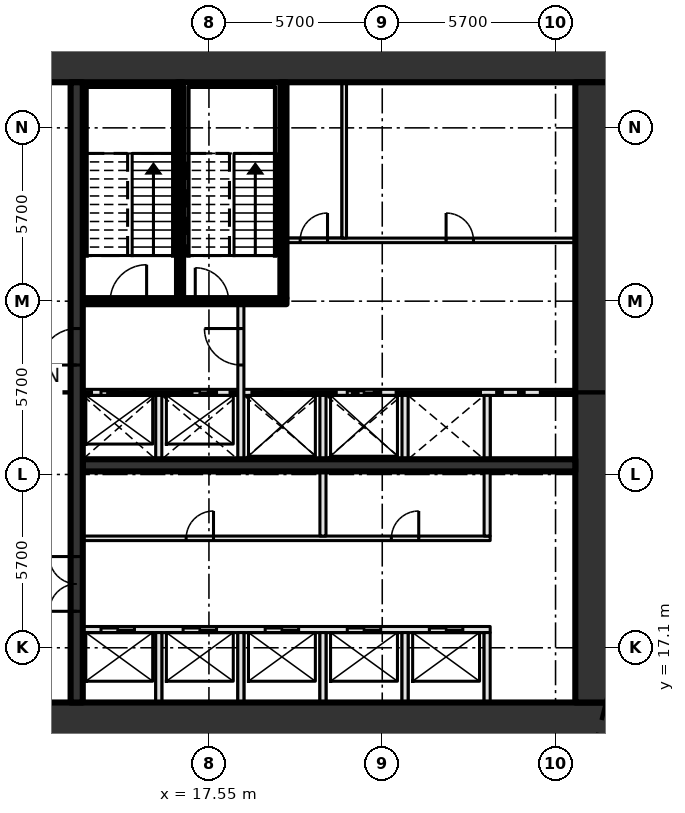
"""IFC4 building model, lengths in metres.
Left out: names, types, materials, properties, quantities, classifications, styles, units other than length and angle.
Written with IfcOpenShell. Run it as: python <this file> out.ifc"""

import sys

from ifc_helpers import new_model, si_unit, direction, frame, frame_2d, origin, place, context, subcontext, project, spatial, rectangle, extrude, element, fill, save


model = new_model("IFC4")
c1 = context("Model", 3, precision=1e-05, world=origin(), true_north=direction((0.0, 1.0)))
c2 = subcontext(c1, "Body", "Model", "MODEL_VIEW")
j1 = project(units=[si_unit("LENGTHUNIT", "METRE"), si_unit("PLANEANGLEUNIT", "RADIAN")], contexts=[c1])
p1 = place(None, origin())
s1 = spatial("IfcSite", under=j1, at=p1, CompositionType="ELEMENT")
p2 = place(p1, origin())
s2 = spatial("IfcBuilding", under=s1, at=p2, CompositionType="ELEMENT")
p3 = place(p2, frame((0.0, 0.0, 18.6)))
s3 = spatial("IfcBuildingStorey", under=s2, at=p3, CompositionType="ELEMENT", Elevation=18.6)
p4 = place(p3, frame((8.0, 14.7, -0.45), z_axis=(0.0, 0.0, 1.0), x_axis=(1.0, 0.0, 0.0)))
e1 = element("IfcWall", 1, at=p4, inside=s3, PredefinedType="SHEAR", context=c2, shape_type="SweptSolid", body=[
    extrude(rectangle(XDim=22.8, YDim=1.2, at=frame_2d((11.4, 0.0))), origin(), (0.0, 0.0, 1.0), 4.8),
])
p5 = place(p4, frame((2.3, 0.0, 0.45)))
e2 = element("IfcOpeningElement", 2, at=p5, cuts=e1, PredefinedType="OPENING", context=c2, shape_type="SweptSolid", body=[
    extrude(rectangle(XDim=1.8, YDim=2.1, at=frame_2d((0.9, 1.05))), frame((0.0, 0.61, 0.0), z_axis=(0.0, -1.0, 0.0), x_axis=(1.0, 0.0, 0.0)), (0.0, 0.0, 1.0), 1.22),
])
p6 = place(p3, frame((8.0, 36.3, -0.45), z_axis=(0.0, 0.0, 1.0), x_axis=(1.0, 0.0, 0.0)))
e3 = element("IfcWall", 3, at=p6, inside=s3, PredefinedType="SHEAR", context=c2, shape_type="SweptSolid", body=[
    extrude(rectangle(XDim=22.8, YDim=1.2, at=frame_2d((11.4, 0.0))), origin(), (0.0, 0.0, 1.0), 4.8),
])
p7 = place(p6, frame((2.3, 0.0, 0.45)))
e4 = element("IfcOpeningElement", 4, at=p7, cuts=e3, PredefinedType="OPENING", context=c2, shape_type="SweptSolid", body=[
    extrude(rectangle(XDim=1.8, YDim=2.1, at=frame_2d((0.9, 1.05))), frame((0.0, 0.61, 0.0), z_axis=(0.0, -1.0, 0.0), x_axis=(1.0, 0.0, 0.0)), (0.0, 0.0, 1.0), 1.22),
])
p8 = place(p3, frame((30.2, 15.3, -0.45), z_axis=(0.0, 0.0, 1.0), x_axis=(0.0, 1.0, 0.0)))
e5 = element("IfcWall", 5, at=p8, inside=s3, PredefinedType="SHEAR", context=c2, shape_type="SweptSolid", body=[
    extrude(rectangle(XDim=20.4, YDim=1.2, at=frame_2d((10.2, 0.0))), origin(), (0.0, 0.0, 1.0), 4.8),
])
p9 = place(p3, frame((13.4, 17.7, 0.0), z_axis=(0.0, 0.0, 1.0), x_axis=(1.0, 0.0, 0.0)))
e6 = element("IfcWall", 6, at=p9, inside=s3, PredefinedType="SOLIDWALL", context=c2, shape_type="SweptSolid", body=[
    extrude(rectangle(XDim=13.4, YDim=0.2, at=frame_2d((6.7, 0.0))), origin(), (0.0, 0.0, 1.0), 4.35),
])
p10 = place(p9, frame((0.6, 0.0, 0.0)))
e7 = element("IfcOpeningElement", 7, at=p10, cuts=e6, PredefinedType="OPENING", context=c2, shape_type="SweptSolid", body=[
    extrude(rectangle(XDim=1.1, YDim=2.1, at=frame_2d((0.55, 1.05))), frame((0.0, 0.11, 0.0), z_axis=(0.0, -1.0, 0.0), x_axis=(1.0, 0.0, 0.0)), (0.0, 0.0, 1.0), 0.22),
])
p11 = place(p9, frame((3.3, 0.0, 0.0)))
e8 = element("IfcOpeningElement", 8, at=p11, cuts=e6, PredefinedType="OPENING", context=c2, shape_type="SweptSolid", body=[
    extrude(rectangle(XDim=1.1, YDim=2.1, at=frame_2d((0.55, 1.05))), frame((0.0, 0.11, 0.0), z_axis=(0.0, -1.0, 0.0), x_axis=(1.0, 0.0, 0.0)), (0.0, 0.0, 1.0), 0.22),
])
p12 = place(p9, frame((6.0, 0.0, 0.0)))
e9 = element("IfcOpeningElement", 9, at=p12, cuts=e6, PredefinedType="OPENING", context=c2, shape_type="SweptSolid", body=[
    extrude(rectangle(XDim=1.1, YDim=2.1, at=frame_2d((0.55, 1.05))), frame((0.0, 0.11, 0.0), z_axis=(0.0, -1.0, 0.0), x_axis=(1.0, 0.0, 0.0)), (0.0, 0.0, 1.0), 0.22),
])
p13 = place(p9, frame((8.7, 0.0, 0.0)))
e10 = element("IfcOpeningElement", 10, at=p13, cuts=e6, PredefinedType="OPENING", context=c2, shape_type="SweptSolid", body=[
    extrude(rectangle(XDim=1.1, YDim=2.1, at=frame_2d((0.55, 1.05))), frame((0.0, 0.11, 0.0), z_axis=(0.0, -1.0, 0.0), x_axis=(1.0, 0.0, 0.0)), (0.0, 0.0, 1.0), 0.22),
])
p14 = place(p9, frame((11.4, 0.0, 0.0)))
e11 = element("IfcOpeningElement", 11, at=p14, cuts=e6, PredefinedType="OPENING", context=c2, shape_type="SweptSolid", body=[
    extrude(rectangle(XDim=1.1, YDim=2.1, at=frame_2d((0.55, 1.05))), frame((0.0, 0.11, 0.0), z_axis=(0.0, -1.0, 0.0), x_axis=(1.0, 0.0, 0.0)), (0.0, 0.0, 1.0), 0.22),
])
p15 = place(p3, frame((13.4, 20.7, 0.0), z_axis=(0.0, 0.0, 1.0), x_axis=(1.0, 0.0, 0.0)))
e12 = element("IfcWall", 12, at=p15, inside=s3, PredefinedType="PARTITIONING", context=c2, shape_type="SweptSolid", body=[
    extrude(rectangle(XDim=13.4, YDim=0.15, at=frame_2d((6.7, 0.0))), origin(), (0.0, 0.0, 1.0), 4.35),
])
p16 = place(p15, frame((3.4, 0.0, 0.0)))
e13 = element("IfcOpeningElement", 13, at=p16, cuts=e12, PredefinedType="OPENING", context=c2, shape_type="SweptSolid", body=[
    extrude(rectangle(XDim=0.9, YDim=2.1, at=frame_2d((0.45, 1.05))), frame((0.0, 0.085, 0.0), z_axis=(0.0, -1.0, 0.0), x_axis=(1.0, 0.0, 0.0)), (0.0, 0.0, 1.0), 0.17),
])
p17 = place(p15, frame((10.15, 0.0, 0.0)))
e14 = element("IfcOpeningElement", 14, at=p17, cuts=e12, PredefinedType="OPENING", context=c2, shape_type="SweptSolid", body=[
    extrude(rectangle(XDim=0.9, YDim=2.1, at=frame_2d((0.45, 1.05))), frame((0.0, 0.085, 0.0), z_axis=(0.0, -1.0, 0.0), x_axis=(1.0, 0.0, 0.0)), (0.0, 0.0, 1.0), 0.17),
])
p18 = place(p3, frame((13.4, 23.1, 0.0), z_axis=(0.0, 0.0, 1.0), x_axis=(1.0, 0.0, 0.0)))
e15 = element("IfcWall", 15, at=p18, inside=s3, PredefinedType="SHEAR", context=c2, shape_type="SweptSolid", body=[
    extrude(rectangle(XDim=16.2, YDim=0.4, at=frame_2d((8.1, 0.0))), origin(), (0.0, 0.0, 1.0), 4.35),
])
p19 = place(p3, frame((13.4, 25.5, 0.0), z_axis=(0.0, 0.0, 1.0), x_axis=(1.0, 0.0, 0.0)))
e16 = element("IfcWall", 16, at=p19, inside=s3, PredefinedType="SOLIDWALL", context=c2, shape_type="SweptSolid", body=[
    extrude(rectangle(XDim=16.2, YDim=0.2, at=frame_2d((8.1, 0.0))), origin(), (0.0, 0.0, 1.0), 4.35),
])
p20 = place(p19, frame((0.6, 0.0, 0.0)))
e17 = element("IfcOpeningElement", 17, at=p20, cuts=e16, PredefinedType="OPENING", context=c2, shape_type="SweptSolid", body=[
    extrude(rectangle(XDim=1.1, YDim=2.1, at=frame_2d((0.55, 1.05))), frame((0.0, 0.11, 0.0), z_axis=(0.0, -1.0, 0.0), x_axis=(1.0, 0.0, 0.0)), (0.0, 0.0, 1.0), 0.22),
])
p21 = place(p19, frame((3.3, 0.0, 0.0)))
e18 = element("IfcOpeningElement", 18, at=p21, cuts=e16, PredefinedType="OPENING", context=c2, shape_type="SweptSolid", body=[
    extrude(rectangle(XDim=1.1, YDim=2.1, at=frame_2d((0.55, 1.05))), frame((0.0, 0.11, 0.0), z_axis=(0.0, -1.0, 0.0), x_axis=(1.0, 0.0, 0.0)), (0.0, 0.0, 1.0), 0.22),
])
p22 = place(p19, frame((6.0, 0.0, 0.0)))
e19 = element("IfcOpeningElement", 19, at=p22, cuts=e16, PredefinedType="OPENING", context=c2, shape_type="SweptSolid", body=[
    extrude(rectangle(XDim=1.1, YDim=2.1, at=frame_2d((0.55, 1.05))), frame((0.0, 0.11, 0.0), z_axis=(0.0, -1.0, 0.0), x_axis=(1.0, 0.0, 0.0)), (0.0, 0.0, 1.0), 0.22),
])
p23 = place(p19, frame((8.7, 0.0, 0.0)))
e20 = element("IfcOpeningElement", 20, at=p23, cuts=e16, PredefinedType="OPENING", context=c2, shape_type="SweptSolid", body=[
    extrude(rectangle(XDim=1.1, YDim=2.1, at=frame_2d((0.55, 1.05))), frame((0.0, 0.11, 0.0), z_axis=(0.0, -1.0, 0.0), x_axis=(1.0, 0.0, 0.0)), (0.0, 0.0, 1.0), 0.22),
])
p24 = place(p3, frame((13.4, 28.5, 0.0), z_axis=(0.0, 0.0, 1.0), x_axis=(1.0, 0.0, 0.0)))
e21 = element("IfcWall", 21, at=p24, inside=s3, PredefinedType="SOLIDWALL", context=c2, shape_type="SweptSolid", body=[
    extrude(rectangle(XDim=6.7, YDim=0.2, at=frame_2d((3.35, 0.0))), origin(), (0.0, 0.0, 1.0), 4.35),
])
p25 = place(p24, frame((0.9, 0.0, 0.0)))
e22 = element("IfcOpeningElement", 22, at=p25, cuts=e21, PredefinedType="OPENING", context=c2, shape_type="SweptSolid", body=[
    extrude(rectangle(XDim=1.2, YDim=2.1, at=frame_2d((0.6, 1.05))), frame((0.0, 0.11, 0.0), z_axis=(0.0, -1.0, 0.0), x_axis=(1.0, 0.0, 0.0)), (0.0, 0.0, 1.0), 0.22),
])
p26 = place(p24, frame((3.7, 0.0, 0.0)))
e23 = element("IfcOpeningElement", 23, at=p26, cuts=e21, PredefinedType="OPENING", context=c2, shape_type="SweptSolid", body=[
    extrude(rectangle(XDim=1.1, YDim=2.1, at=frame_2d((0.55, 1.05))), frame((0.0, 0.11, 0.0), z_axis=(0.0, -1.0, 0.0), x_axis=(1.0, 0.0, 0.0)), (0.0, 0.0, 1.0), 0.22),
])
p27 = place(p3, frame((20.1, 30.5, 0.0), z_axis=(0.0, 0.0, 1.0), x_axis=(1.0, 0.0, 0.0)))
e24 = element("IfcWall", 24, at=p27, inside=s3, PredefinedType="PARTITIONING", context=c2, shape_type="SweptSolid", body=[
    extrude(rectangle(XDim=9.5, YDim=0.15, at=frame_2d((4.75, 0.0))), origin(), (0.0, 0.0, 1.0), 4.35),
])
p28 = place(p27, frame((0.45, 0.0, 0.0)))
e25 = element("IfcOpeningElement", 25, at=p28, cuts=e24, PredefinedType="OPENING", context=c2, shape_type="SweptSolid", body=[
    extrude(rectangle(XDim=0.9, YDim=2.1, at=frame_2d((0.45, 1.05))), frame((0.0, 0.085, 0.0), z_axis=(0.0, -1.0, 0.0), x_axis=(1.0, 0.0, 0.0)), (0.0, 0.0, 1.0), 0.17),
])
p29 = place(p27, frame((5.25, 0.0, 0.0)))
e26 = element("IfcOpeningElement", 26, at=p29, cuts=e24, PredefinedType="OPENING", context=c2, shape_type="SweptSolid", body=[
    extrude(rectangle(XDim=0.9, YDim=2.1, at=frame_2d((0.45, 1.05))), frame((0.0, 0.085, 0.0), z_axis=(0.0, -1.0, 0.0), x_axis=(1.0, 0.0, 0.0)), (0.0, 0.0, 1.0), 0.17),
])
p30 = place(p3, frame((13.2, 15.3, 0.0), z_axis=(0.0, 0.0, 1.0), x_axis=(0.0, 1.0, 0.0)))
e27 = element("IfcWall", 27, at=p30, inside=s3, PredefinedType="SHEAR", context=c2, shape_type="SweptSolid", body=[
    extrude(rectangle(XDim=20.4, YDim=0.4, at=frame_2d((10.2, 0.0))), origin(), (0.0, 0.0, 1.0), 4.35),
])
p31 = place(p30, frame((3.0, 0.0, 0.0)))
e28 = element("IfcOpeningElement", 28, at=p31, cuts=e27, PredefinedType="OPENING", context=c2, shape_type="SweptSolid", body=[
    extrude(rectangle(XDim=1.8, YDim=2.1, at=frame_2d((0.9, 1.05))), frame((0.0, 0.21, 0.0), z_axis=(0.0, -1.0, 0.0), x_axis=(1.0, 0.0, 0.0)), (0.0, 0.0, 1.0), 0.42),
])
p32 = place(p30, frame((11.1, 0.0, 0.0)))
e29 = element("IfcOpeningElement", 29, at=p32, cuts=e27, PredefinedType="OPENING", context=c2, shape_type="SweptSolid", body=[
    extrude(rectangle(XDim=1.2, YDim=2.1, at=frame_2d((0.6, 1.05))), frame((0.0, 0.21, 0.0), z_axis=(0.0, -1.0, 0.0), x_axis=(1.0, 0.0, 0.0)), (0.0, 0.0, 1.0), 0.42),
])
p33 = place(p3, frame((15.9, 15.3, 0.0), z_axis=(0.0, 0.0, 1.0), x_axis=(0.0, 1.0, 0.0)))
e30 = element("IfcWall", 30, at=p33, inside=s3, PredefinedType="SOLIDWALL", context=c2, shape_type="SweptSolid", body=[
    extrude(rectangle(XDim=2.3, YDim=0.2, at=frame_2d((1.15, 0.0))), origin(), (0.0, 0.0, 1.0), 4.35),
])
p34 = place(p3, frame((15.9, 23.3, 0.0), z_axis=(0.0, 0.0, 1.0), x_axis=(0.0, 1.0, 0.0)))
e31 = element("IfcWall", 31, at=p34, inside=s3, PredefinedType="SOLIDWALL", context=c2, shape_type="SweptSolid", body=[
    extrude(rectangle(XDim=2.1, YDim=0.2, at=frame_2d((1.05, 0.0))), origin(), (0.0, 0.0, 1.0), 4.35),
])
p35 = place(p3, frame((16.6, 28.6, 0.0), z_axis=(0.0, 0.0, 1.0), x_axis=(0.0, 1.0, 0.0)))
e32 = element("IfcWall", 32, at=p35, inside=s3, PredefinedType="SOLIDWALL", context=c2, shape_type="SweptSolid", body=[
    extrude(rectangle(XDim=7.1, YDim=0.2, at=frame_2d((3.55, 0.0))), origin(), (0.0, 0.0, 1.0), 4.35),
])
p36 = place(p3, frame((18.6, 15.3, 0.0), z_axis=(0.0, 0.0, 1.0), x_axis=(0.0, 1.0, 0.0)))
e33 = element("IfcWall", 33, at=p36, inside=s3, PredefinedType="SOLIDWALL", context=c2, shape_type="SweptSolid", body=[
    extrude(rectangle(XDim=2.3, YDim=0.2, at=frame_2d((1.15, 0.0))), origin(), (0.0, 0.0, 1.0), 4.35),
])
p37 = place(p3, frame((18.6, 23.3, 0.0), z_axis=(0.0, 0.0, 1.0), x_axis=(0.0, 1.0, 0.0)))
e34 = element("IfcWall", 34, at=p37, inside=s3, PredefinedType="SOLIDWALL", context=c2, shape_type="SweptSolid", body=[
    extrude(rectangle(XDim=5.1, YDim=0.2, at=frame_2d((2.55, 0.0))), origin(), (0.0, 0.0, 1.0), 4.35),
])
p38 = place(p37, frame((3.1, 0.0, 0.0)))
e35 = element("IfcOpeningElement", 35, at=p38, cuts=e34, PredefinedType="OPENING", context=c2, shape_type="SweptSolid", body=[
    extrude(rectangle(XDim=1.2, YDim=2.1, at=frame_2d((0.6, 1.05))), frame((0.0, 0.11, 0.0), z_axis=(0.0, -1.0, 0.0), x_axis=(1.0, 0.0, 0.0)), (0.0, 0.0, 1.0), 0.22),
])
p39 = place(p3, frame((20.0, 28.6, 0.0), z_axis=(0.0, 0.0, 1.0), x_axis=(0.0, 1.0, 0.0)))
e36 = element("IfcWall", 36, at=p39, inside=s3, PredefinedType="SOLIDWALL", context=c2, shape_type="SweptSolid", body=[
    extrude(rectangle(XDim=7.1, YDim=0.2, at=frame_2d((3.55, 0.0))), origin(), (0.0, 0.0, 1.0), 4.35),
])
p40 = place(p3, frame((21.3, 15.3, 0.0), z_axis=(0.0, 0.0, 1.0), x_axis=(0.0, 1.0, 0.0)))
e37 = element("IfcWall", 37, at=p40, inside=s3, PredefinedType="SOLIDWALL", context=c2, shape_type="SweptSolid", body=[
    extrude(rectangle(XDim=2.3, YDim=0.2, at=frame_2d((1.15, 0.0))), origin(), (0.0, 0.0, 1.0), 4.35),
])
p41 = place(p3, frame((21.3, 20.775, 0.0), z_axis=(0.0, 0.0, 1.0), x_axis=(0.0, 1.0, 0.0)))
e38 = element("IfcWall", 38, at=p41, inside=s3, PredefinedType="SOLIDWALL", context=c2, shape_type="SweptSolid", body=[
    extrude(rectangle(XDim=4.625, YDim=0.2, at=frame_2d((2.312, 0.0))), origin(), (0.0, 0.0, 1.0), 4.35),
])
p42 = place(p3, frame((22.0, 30.575, 0.0), z_axis=(0.0, 0.0, 1.0), x_axis=(0.0, 1.0, 0.0)))
e39 = element("IfcWall", 39, at=p42, inside=s3, PredefinedType="PARTITIONING", context=c2, shape_type="SweptSolid", body=[
    extrude(rectangle(XDim=5.125, YDim=0.15, at=frame_2d((2.562, 0.0))), origin(), (0.0, 0.0, 1.0), 4.35),
])
p43 = place(p3, frame((24.0, 15.3, 0.0), z_axis=(0.0, 0.0, 1.0), x_axis=(0.0, 1.0, 0.0)))
e40 = element("IfcWall", 40, at=p43, inside=s3, PredefinedType="SOLIDWALL", context=c2, shape_type="SweptSolid", body=[
    extrude(rectangle(XDim=2.3, YDim=0.2, at=frame_2d((1.15, 0.0))), origin(), (0.0, 0.0, 1.0), 4.35),
])
p44 = place(p3, frame((24.0, 23.3, 0.0), z_axis=(0.0, 0.0, 1.0), x_axis=(0.0, 1.0, 0.0)))
e41 = element("IfcWall", 41, at=p44, inside=s3, PredefinedType="SOLIDWALL", context=c2, shape_type="SweptSolid", body=[
    extrude(rectangle(XDim=2.1, YDim=0.2, at=frame_2d((1.05, 0.0))), origin(), (0.0, 0.0, 1.0), 4.35),
])
p45 = place(p3, frame((26.7, 15.3, 0.0), z_axis=(0.0, 0.0, 1.0), x_axis=(0.0, 1.0, 0.0)))
e42 = element("IfcWall", 42, at=p45, inside=s3, PredefinedType="SOLIDWALL", context=c2, shape_type="SweptSolid", body=[
    extrude(rectangle(XDim=2.3, YDim=0.2, at=frame_2d((1.15, 0.0))), origin(), (0.0, 0.0, 1.0), 4.35),
])
p46 = place(p3, frame((26.7, 20.775, 0.0), z_axis=(0.0, 0.0, 1.0), x_axis=(0.0, 1.0, 0.0)))
e43 = element("IfcWall", 43, at=p46, inside=s3, PredefinedType="SOLIDWALL", context=c2, shape_type="SweptSolid", body=[
    extrude(rectangle(XDim=4.625, YDim=0.2, at=frame_2d((2.312, 0.0))), origin(), (0.0, 0.0, 1.0), 4.35),
])
p47 = place(p10, origin())
e44 = element("IfcDoor", 44, at=p47, inside=s3, OperationType="SLIDING_TO_LEFT", PredefinedType="DOOR", context=c2, shape_type="SweptSolid", body=[
    extrude(rectangle(XDim=1.1, YDim=2.1, at=frame_2d((0.55, 1.05))), frame((0.0, 0.025, 0.0), z_axis=(0.0, -1.0, 0.0), x_axis=(1.0, 0.0, 0.0)), (0.0, 0.0, 1.0), 0.05),
])
fill(e7, e44)
p48 = place(p11, origin())
e45 = element("IfcDoor", 45, at=p48, inside=s3, OperationType="SLIDING_TO_LEFT", PredefinedType="DOOR", context=c2, shape_type="SweptSolid", body=[
    extrude(rectangle(XDim=1.1, YDim=2.1, at=frame_2d((0.55, 1.05))), frame((0.0, 0.025, 0.0), z_axis=(0.0, -1.0, 0.0), x_axis=(1.0, 0.0, 0.0)), (0.0, 0.0, 1.0), 0.05),
])
fill(e8, e45)
p49 = place(p12, origin())
e46 = element("IfcDoor", 46, at=p49, inside=s3, OperationType="SLIDING_TO_LEFT", PredefinedType="DOOR", context=c2, shape_type="SweptSolid", body=[
    extrude(rectangle(XDim=1.1, YDim=2.1, at=frame_2d((0.55, 1.05))), frame((0.0, 0.025, 0.0), z_axis=(0.0, -1.0, 0.0), x_axis=(1.0, 0.0, 0.0)), (0.0, 0.0, 1.0), 0.05),
])
fill(e9, e46)
p50 = place(p13, origin())
e47 = element("IfcDoor", 47, at=p50, inside=s3, OperationType="SLIDING_TO_LEFT", PredefinedType="DOOR", context=c2, shape_type="SweptSolid", body=[
    extrude(rectangle(XDim=1.1, YDim=2.1, at=frame_2d((0.55, 1.05))), frame((0.0, 0.025, 0.0), z_axis=(0.0, -1.0, 0.0), x_axis=(1.0, 0.0, 0.0)), (0.0, 0.0, 1.0), 0.05),
])
fill(e10, e47)
p51 = place(p14, origin())
e48 = element("IfcDoor", 48, at=p51, inside=s3, OperationType="SLIDING_TO_LEFT", PredefinedType="DOOR", context=c2, shape_type="SweptSolid", body=[
    extrude(rectangle(XDim=1.1, YDim=2.1, at=frame_2d((0.55, 1.05))), frame((0.0, 0.025, 0.0), z_axis=(0.0, -1.0, 0.0), x_axis=(1.0, 0.0, 0.0)), (0.0, 0.0, 1.0), 0.05),
])
fill(e11, e48)
p52 = place(p20, origin())
e49 = element("IfcDoor", 49, at=p52, inside=s3, OperationType="SLIDING_TO_LEFT", PredefinedType="DOOR", context=c2, shape_type="SweptSolid", body=[
    extrude(rectangle(XDim=1.1, YDim=2.1, at=frame_2d((0.55, 1.05))), frame((0.0, 0.025, 0.0), z_axis=(0.0, -1.0, 0.0), x_axis=(1.0, 0.0, 0.0)), (0.0, 0.0, 1.0), 0.05),
])
fill(e17, e49)
p53 = place(p21, origin())
e50 = element("IfcDoor", 50, at=p53, inside=s3, OperationType="SLIDING_TO_LEFT", PredefinedType="DOOR", context=c2, shape_type="SweptSolid", body=[
    extrude(rectangle(XDim=1.1, YDim=2.1, at=frame_2d((0.55, 1.05))), frame((0.0, 0.025, 0.0), z_axis=(0.0, -1.0, 0.0), x_axis=(1.0, 0.0, 0.0)), (0.0, 0.0, 1.0), 0.05),
])
fill(e18, e50)
p54 = place(p22, origin())
e51 = element("IfcDoor", 51, at=p54, inside=s3, OperationType="SLIDING_TO_LEFT", PredefinedType="DOOR", context=c2, shape_type="SweptSolid", body=[
    extrude(rectangle(XDim=1.1, YDim=2.1, at=frame_2d((0.55, 1.05))), frame((0.0, 0.025, 0.0), z_axis=(0.0, -1.0, 0.0), x_axis=(1.0, 0.0, 0.0)), (0.0, 0.0, 1.0), 0.05),
])
fill(e19, e51)
p55 = place(p23, origin())
e52 = element("IfcDoor", 52, at=p55, inside=s3, OperationType="SLIDING_TO_LEFT", PredefinedType="DOOR", context=c2, shape_type="SweptSolid", body=[
    extrude(rectangle(XDim=1.1, YDim=2.1, at=frame_2d((0.55, 1.05))), frame((0.0, 0.025, 0.0), z_axis=(0.0, -1.0, 0.0), x_axis=(1.0, 0.0, 0.0)), (0.0, 0.0, 1.0), 0.05),
])
fill(e20, e52)
p56 = place(p16, origin())
e53 = element("IfcDoor", 53, at=p56, inside=s3, OperationType="SINGLE_SWING_RIGHT", PredefinedType="DOOR", context=c2, shape_type="SweptSolid", body=[
    extrude(rectangle(XDim=0.9, YDim=2.1, at=frame_2d((0.45, 1.05))), frame((0.0, 0.025, 0.0), z_axis=(0.0, -1.0, 0.0), x_axis=(1.0, 0.0, 0.0)), (0.0, 0.0, 1.0), 0.05),
])
fill(e13, e53)
p57 = place(p17, origin())
e54 = element("IfcDoor", 54, at=p57, inside=s3, OperationType="SINGLE_SWING_RIGHT", PredefinedType="DOOR", context=c2, shape_type="SweptSolid", body=[
    extrude(rectangle(XDim=0.9, YDim=2.1, at=frame_2d((0.45, 1.05))), frame((0.0, 0.025, 0.0), z_axis=(0.0, -1.0, 0.0), x_axis=(1.0, 0.0, 0.0)), (0.0, 0.0, 1.0), 0.05),
])
fill(e14, e54)
p58 = place(p28, origin())
e55 = element("IfcDoor", 55, at=p58, inside=s3, OperationType="SINGLE_SWING_RIGHT", PredefinedType="DOOR", context=c2, shape_type="SweptSolid", body=[
    extrude(rectangle(XDim=0.9, YDim=2.1, at=frame_2d((0.45, 1.05))), frame((0.0, 0.025, 0.0), z_axis=(0.0, -1.0, 0.0), x_axis=(1.0, 0.0, 0.0)), (0.0, 0.0, 1.0), 0.05),
])
fill(e25, e55)
p59 = place(p29, origin())
e56 = element("IfcDoor", 56, at=p59, inside=s3, OperationType="SINGLE_SWING_LEFT", PredefinedType="DOOR", context=c2, shape_type="SweptSolid", body=[
    extrude(rectangle(XDim=0.9, YDim=2.1, at=frame_2d((0.45, 1.05))), frame((0.0, 0.025, 0.0), z_axis=(0.0, -1.0, 0.0), x_axis=(1.0, 0.0, 0.0)), (0.0, 0.0, 1.0), 0.05),
])
fill(e26, e56)
p60 = place(p25, origin())
e57 = element("IfcDoor", 57, at=p60, inside=s3, OperationType="SINGLE_SWING_RIGHT", PredefinedType="DOOR", context=c2, shape_type="SweptSolid", body=[
    extrude(rectangle(XDim=1.2, YDim=2.1, at=frame_2d((0.6, 1.05))), frame((0.0, 0.025, 0.0), z_axis=(0.0, -1.0, 0.0), x_axis=(1.0, 0.0, 0.0)), (0.0, 0.0, 1.0), 0.05),
])
fill(e22, e57)
p61 = place(p26, origin())
e58 = element("IfcDoor", 58, at=p61, inside=s3, OperationType="SINGLE_SWING_LEFT", PredefinedType="DOOR", context=c2, shape_type="SweptSolid", body=[
    extrude(rectangle(XDim=1.1, YDim=2.1, at=frame_2d((0.55, 1.05))), frame((0.0, 0.025, 0.0), z_axis=(0.0, -1.0, 0.0), x_axis=(1.0, 0.0, 0.0)), (0.0, 0.0, 1.0), 0.05),
])
fill(e23, e58)
p62 = place(p31, origin())
e59 = element("IfcDoor", 59, at=p62, inside=s3, OperationType="DOUBLE_DOOR_SINGLE_SWING", PredefinedType="DOOR", context=c2, shape_type="SweptSolid", body=[
    extrude(rectangle(XDim=1.8, YDim=2.1, at=frame_2d((0.9, 1.05))), frame((0.0, 0.025, 0.0), z_axis=(0.0, -1.0, 0.0), x_axis=(1.0, 0.0, 0.0)), (0.0, 0.0, 1.0), 0.05),
])
fill(e28, e59)
p63 = place(p32, origin())
e60 = element("IfcDoor", 60, at=p63, inside=s3, OperationType="SINGLE_SWING_LEFT", PredefinedType="DOOR", context=c2, shape_type="SweptSolid", body=[
    extrude(rectangle(XDim=1.2, YDim=2.1, at=frame_2d((0.6, 1.05))), frame((0.0, 0.025, 0.0), z_axis=(0.0, -1.0, 0.0), x_axis=(1.0, 0.0, 0.0)), (0.0, 0.0, 1.0), 0.05),
])
fill(e29, e60)
p64 = place(p38, origin())
e61 = element("IfcDoor", 61, at=p64, inside=s3, OperationType="SINGLE_SWING_RIGHT", PredefinedType="DOOR", context=c2, shape_type="SweptSolid", body=[
    extrude(rectangle(XDim=1.2, YDim=2.1, at=frame_2d((0.6, 1.05))), frame((0.0, 0.025, 0.0), z_axis=(0.0, -1.0, 0.0), x_axis=(1.0, 0.0, 0.0)), (0.0, 0.0, 1.0), 0.05),
])
fill(e35, e61)
save(model, sys.argv[1])
